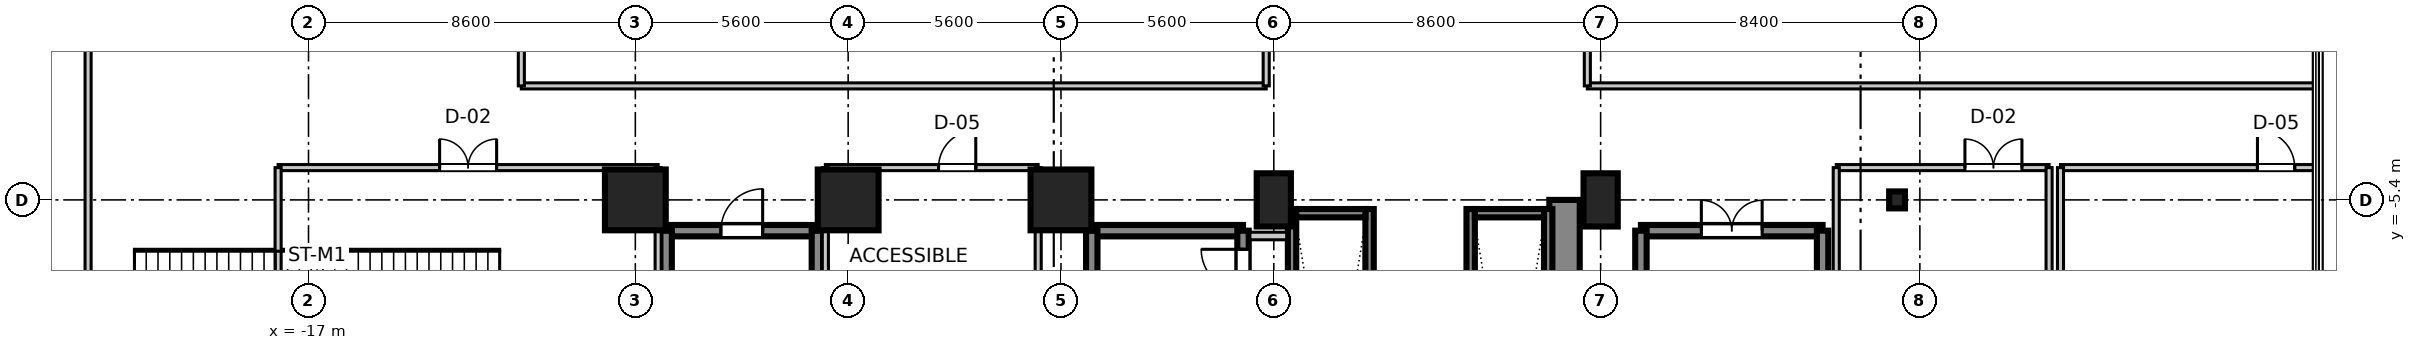
"""IFC4 building model, lengths in metres.
Left out: names, types, materials, properties, quantities, classifications, styles, units other than length and angle.
Written with IfcOpenShell. Run it as: python <this file> out.ifc"""

import sys

from ifc_helpers import new_model, si_unit, direction, frame, frame_2d, origin, origin_2d, place, context, subcontext, project, spatial, rectangle, i_section, extrude, source, transform, mapped, element, fill, save


model = new_model("IFC4")
c1 = context("Model", 3, precision=1e-05, world=origin(), true_north=direction((0.0, 1.0)))
c2 = subcontext(c1, "Body", "Model", "MODEL_VIEW")
j1 = project(units=[si_unit("LENGTHUNIT", "METRE"), si_unit("PLANEANGLEUNIT", "RADIAN")], contexts=[c1])
p1 = place(None, origin())
s1 = spatial("IfcSite", under=j1, at=p1, CompositionType="ELEMENT")
p2 = place(p1, origin())
s2 = spatial("IfcBuilding", under=s1, at=p2, CompositionType="ELEMENT")
p3 = place(p2, frame((0.0, 0.0, 16.2)))
s3 = spatial("IfcBuildingStorey", under=s2, at=p3, CompositionType="ELEMENT", Elevation=16.2)
m1 = source(origin(), c2, "Body", "SweptSolid", [
    extrude(rectangle(XDim=1.6, YDim=1.6, at=origin_2d()), origin(), (0.0, 0.0, 1.0), 5.355),
])
for number, where, z_axis, x_axis in (
    (1, (-8.4, -5.4, 0.0), (0.0, 0.0, 1.0), (1.0, 0.0, 0.0)),
    (2, (-2.8, -5.4, 0.0), (0.0, 0.0, 1.0), (1.0, 0.0, 0.0)),
    (3, (2.8, -5.4, 0.0), (0.0, 0.0, 1.0), (1.0, 0.0, 0.0)),
):
    element("IfcColumn", number, at=place(p3, frame(where, z_axis=z_axis, x_axis=x_axis)), inside=s3, PredefinedType="COLUMN", context=c2, shape_type="MappedRepresentation", body=[
        mapped(m1, transform((0.0, 0.0, 0.0), scale=1.0)),
    ])
m2 = source(origin(), c2, "Body", "SweptSolid", [
    extrude(rectangle(XDim=0.9, YDim=1.4, at=origin_2d()), origin(), (0.0, 0.0, 1.0), 5.355),
])
for number, where, z_axis, x_axis in (
    (4, (8.4, -5.4, 0.0), (0.0, 0.0, 1.0), (1.0, 0.0, 0.0)),
    (5, (17.0, -5.4, 0.0), (0.0, 0.0, 1.0), (1.0, 0.0, 0.0)),
):
    element("IfcColumn", number, at=place(p3, frame(where, z_axis=z_axis, x_axis=x_axis)), inside=s3, PredefinedType="PILASTER", context=c2, shape_type="MappedRepresentation", body=[
        mapped(m2, transform((0.0, 0.0, 0.0), scale=1.0)),
    ])
m3 = source(origin(), c2, "Body", "SweptSolid", [
    extrude(i_section(OverallWidth=0.416, OverallDepth=0.446, WebThickness=0.025, FlangeThickness=0.04, at=origin_2d()), origin(), (0.0, 0.0, 1.0), 5.355),
])
p4 = place(p3, frame((24.8, -5.4, 0.0), z_axis=(0.0, 0.0, 1.0), x_axis=(1.0, 0.0, 0.0)))
e6 = element("IfcColumn", 6, at=p4, inside=s3, PredefinedType="COLUMN", context=c2, shape_type="MappedRepresentation", body=[
    mapped(m3, transform((0.0, 0.0, 0.0), scale=1.0)),
])
m4 = source(origin(), c2, "Body", "SweptSolid", [
    extrude(rectangle(XDim=11.6, YDim=0.8, at=frame_2d((5.8, 0.0))), origin(), (0.0, 0.0, 1.0), 5.08),
])
p5 = place(p3, frame((16.05, -17.0, 0.0), z_axis=(0.0, 0.0, 1.0), x_axis=(0.0, 1.0, 0.0)))
e7 = element("IfcWall", 7, at=p5, inside=s3, PredefinedType="SHEAR", context=c2, shape_type="MappedRepresentation", body=[
    mapped(m4, transform((0.0, 0.0, 0.0), scale=1.0)),
])
m5 = source(origin(), c2, "Body", "SweptSolid", [
    extrude(rectangle(XDim=3.98, YDim=0.3, at=frame_2d((1.99, 0.0))), origin(), (0.0, 0.0, 1.0), 5.08),
])
p6 = place(p3, frame((3.61, -6.21, 0.0), z_axis=(0.0, 0.0, 1.0), x_axis=(1.0, 0.0, 0.0)))
e8 = element("IfcWall", 8, at=p6, inside=s3, PredefinedType="SHEAR", context=c2, shape_type="MappedRepresentation", body=[
    mapped(m5, transform((0.0, 0.0, 0.0), scale=1.0)),
])
m6 = source(origin(), c2, "Body", "SweptSolid", [
    extrude(rectangle(XDim=9.38, YDim=0.3, at=frame_2d((4.69, 0.0))), origin(), (0.0, 0.0, 1.0), 5.08),
])
p7 = place(p3, frame((3.61, -15.59, 0.0), z_axis=(0.0, 0.0, 1.0), x_axis=(0.0, 1.0, 0.0)))
e9 = element("IfcWall", 9, at=p7, inside=s3, PredefinedType="SHEAR", context=c2, shape_type="MappedRepresentation", body=[
    mapped(m6, transform((0.0, 0.0, 0.0), scale=1.0)),
])
p8 = place(p3, frame((7.59, -15.59, 0.0), z_axis=(0.0, 0.0, 1.0), x_axis=(0.0, 1.0, 0.0)))
e10 = element("IfcWall", 10, at=p8, inside=s3, PredefinedType="SHEAR", context=c2, shape_type="MappedRepresentation", body=[
    mapped(m6, transform((0.0, 0.0, 0.0), scale=1.0)),
])
p9 = place(p8, frame((7.79, 0.0, 0.0)))
e11 = element("IfcOpeningElement", 11, at=p9, cuts=e10, PredefinedType="OPENING", context=c2, shape_type="SweptSolid", body=[
    extrude(rectangle(XDim=1.1, YDim=2.15, at=frame_2d((0.55, 1.075))), frame((0.0, 0.16, 0.0), z_axis=(0.0, -1.0, 0.0), x_axis=(1.0, 0.0, 0.0)), (0.0, 0.0, 1.0), 0.32),
])
p10 = place(p3, frame((-7.59, -6.21, 0.0), z_axis=(0.0, 0.0, 1.0), x_axis=(1.0, 0.0, 0.0)))
e12 = element("IfcWall", 12, at=p10, inside=s3, PredefinedType="SHEAR", context=c2, shape_type="MappedRepresentation", body=[
    mapped(m5, transform((0.0, 0.0, 0.0), scale=1.0)),
])
p11 = place(p10, frame((1.44, 0.0, 0.0)))
e13 = element("IfcOpeningElement", 13, at=p11, cuts=e12, PredefinedType="OPENING", context=c2, shape_type="SweptSolid", body=[
    extrude(rectangle(XDim=1.1, YDim=2.15, at=frame_2d((0.55, 1.075))), frame((0.0, 0.16, 0.0), z_axis=(0.0, -1.0, 0.0), x_axis=(1.0, 0.0, 0.0)), (0.0, 0.0, 1.0), 0.32),
])
for number, where, z_axis, x_axis in (
    (14, (-7.59, -15.59, 0.0), (0.0, 0.0, 1.0), (0.0, 1.0, 0.0)),
    (15, (-3.61, -15.59, 0.0), (0.0, 0.0, 1.0), (0.0, 1.0, 0.0)),
):
    element("IfcWall", number, at=place(p3, frame(where, z_axis=z_axis, x_axis=x_axis)), inside=s3, PredefinedType="SHEAR", context=c2, shape_type="MappedRepresentation", body=[
        mapped(m6, transform((0.0, 0.0, 0.0), scale=1.0)),
    ])
m7 = source(origin(), c2, "Body", "SweptSolid", [
    extrude(rectangle(XDim=4.78, YDim=0.3, at=frame_2d((2.39, 0.0))), origin(), (0.0, 0.0, 1.0), 5.08),
])
p12 = place(p3, frame((18.06, -6.21, 0.0), z_axis=(0.0, 0.0, 1.0), x_axis=(1.0, 0.0, 0.0)))
e16 = element("IfcWall", 16, at=p12, inside=s3, PredefinedType="SHEAR", context=c2, shape_type="MappedRepresentation", body=[
    mapped(m7, transform((0.0, 0.0, 0.0), scale=1.0)),
])
p13 = place(p12, frame((1.59, 0.0, 0.0)))
e17 = element("IfcOpeningElement", 17, at=p13, cuts=e16, PredefinedType="OPENING", context=c2, shape_type="SweptSolid", body=[
    extrude(rectangle(XDim=1.6, YDim=2.2, at=frame_2d((0.8, 1.1))), frame((0.0, 0.16, 0.0), z_axis=(0.0, -1.0, 0.0), x_axis=(1.0, 0.0, 0.0)), (0.0, 0.0, 1.0), 0.32),
])
m8 = source(origin(), c2, "Body", "SweptSolid", [
    extrude(rectangle(XDim=9.63, YDim=0.3, at=frame_2d((4.815, 0.0))), origin(), (0.0, 0.0, 1.0), 5.08),
])
for number, where, z_axis, x_axis in (
    (18, (18.06, -15.84, 0.0), (0.0, 0.0, 1.0), (0.0, 1.0, 0.0)),
    (19, (22.84, -15.84, 0.0), (0.0, 0.0, 1.0), (0.0, 1.0, 0.0)),
):
    element("IfcWall", number, at=place(p3, frame(where, z_axis=z_axis, x_axis=x_axis)), inside=s3, PredefinedType="SHEAR", context=c2, shape_type="MappedRepresentation", body=[
        mapped(m8, transform((0.0, 0.0, 0.0), scale=1.0)),
    ])
m9 = source(origin(), c2, "Body", "SweptSolid", [
    extrude(rectangle(XDim=2.36, YDim=0.22, at=frame_2d((1.18, 0.0))), origin(), (0.0, 0.0, 1.0), 5.08),
])
for number, where, z_axis, x_axis in (
    (20, (13.58, -8.0, 0.0), (0.0, 0.0, 1.0), (0.0, 1.0, 0.0)),
    (21, (15.62, -8.0, 0.0), (0.0, 0.0, 1.0), (0.0, 1.0, 0.0)),
):
    element("IfcWall", number, at=place(p3, frame(where, z_axis=z_axis, x_axis=x_axis)), inside=s3, PredefinedType="SHEAR", context=c2, shape_type="MappedRepresentation", body=[
        mapped(m9, transform((0.0, 0.0, 0.0), scale=1.0)),
    ])
m10 = source(origin(), c2, "Body", "SweptSolid", [
    extrude(rectangle(XDim=1.82, YDim=0.22, at=frame_2d((0.91, 0.0))), origin(), (0.0, 0.0, 1.0), 5.08),
])
p14 = place(p3, frame((13.69, -5.75, 0.0), z_axis=(0.0, 0.0, 1.0), x_axis=(1.0, 0.0, 0.0)))
e22 = element("IfcWall", 22, at=p14, inside=s3, PredefinedType="SHEAR", context=c2, shape_type="MappedRepresentation", body=[
    mapped(m10, transform((0.0, 0.0, 0.0), scale=1.0)),
])
for number, where, z_axis, x_axis in (
    (23, (8.88, -8.0, 0.0), (0.0, 0.0, 1.0), (0.0, 1.0, 0.0)),
    (24, (10.92, -8.0, 0.0), (0.0, 0.0, 1.0), (0.0, 1.0, 0.0)),
):
    element("IfcWall", number, at=place(p3, frame(where, z_axis=z_axis, x_axis=x_axis)), inside=s3, PredefinedType="SHEAR", context=c2, shape_type="MappedRepresentation", body=[
        mapped(m9, transform((0.0, 0.0, 0.0), scale=1.0)),
    ])
p15 = place(p3, frame((8.99, -5.75, 0.0), z_axis=(0.0, 0.0, 1.0), x_axis=(1.0, 0.0, 0.0)))
e25 = element("IfcWall", 25, at=p15, inside=s3, PredefinedType="SHEAR", context=c2, shape_type="MappedRepresentation", body=[
    mapped(m10, transform((0.0, 0.0, 0.0), scale=1.0)),
])
m11 = source(origin(), c2, "Body", "SweptSolid", [
    extrude(rectangle(XDim=0.97, YDim=0.2, at=frame_2d((0.485, 0.0))), origin(), (0.0, 0.0, 1.0), 3.4),
])
p16 = place(p3, frame((7.77, -6.35, 0.0), z_axis=(0.0, 0.0, 1.0), x_axis=(1.0, 0.0, 0.0)))
e26 = element("IfcWall", 26, at=p16, inside=s3, PredefinedType="PARTITIONING", context=c2, shape_type="MappedRepresentation", body=[
    mapped(m11, transform((0.0, 0.0, 0.0), scale=1.0)),
])
m12 = source(origin(), c2, "Body", "SweptSolid", [
    extrude(rectangle(XDim=33.6, YDim=0.16, at=frame_2d((16.8, 0.0))), origin(), (0.0, 0.0, 1.0), 3.4),
])
p17 = place(p3, frame((-22.8, -16.8, 0.0), z_axis=(0.0, 0.0, 1.0), x_axis=(0.0, 1.0, 0.0)))
e27 = element("IfcWall", 27, at=p17, inside=s3, PredefinedType="PARTITIONING", context=c2, shape_type="MappedRepresentation", body=[
    mapped(m12, transform((0.0, 0.0, 0.0), scale=1.0)),
])
p18 = place(p17, frame((16.05, 0.0, 0.0)))
e28 = element("IfcOpeningElement", 28, at=p18, cuts=e27, PredefinedType="OPENING", context=c2, shape_type="SweptSolid", body=[
    extrude(rectangle(XDim=1.5, YDim=2.15, at=frame_2d((0.75, 1.075))), frame((0.0, 0.09, 0.0), z_axis=(0.0, -1.0, 0.0), x_axis=(1.0, 0.0, 0.0)), (0.0, 0.0, 1.0), 0.18),
])
m13 = source(origin(), c2, "Body", "SweptSolid", [
    extrude(rectangle(XDim=19.6, YDim=0.16, at=frame_2d((9.8, 0.0))), origin(), (0.0, 0.0, 1.0), 3.4),
])
p19 = place(p3, frame((-11.4, -2.4, 0.0), z_axis=(0.0, 0.0, 1.0), x_axis=(1.0, 0.0, 0.0)))
e29 = element("IfcWall", 29, at=p19, inside=s3, PredefinedType="PARTITIONING", context=c2, shape_type="MappedRepresentation", body=[
    mapped(m13, transform((0.0, 0.0, 0.0), scale=1.0)),
])
m14 = source(origin(), c2, "Body", "SweptSolid", [
    extrude(rectangle(XDim=4.8, YDim=0.16, at=frame_2d((2.4, 0.0))), origin(), (0.0, 0.0, 1.0), 3.4),
])
for number, where, z_axis, x_axis in (
    (30, (-11.4, -2.4, 0.0), (0.0, 0.0, 1.0), (0.0, 1.0, 0.0)),
    (31, (8.2, -2.4, 0.0), (0.0, 0.0, 1.0), (0.0, 1.0, 0.0)),
):
    element("IfcWall", number, at=place(p3, frame(where, z_axis=z_axis, x_axis=x_axis)), inside=s3, PredefinedType="PARTITIONING", context=c2, shape_type="MappedRepresentation", body=[
        mapped(m14, transform((0.0, 0.0, 0.0), scale=1.0)),
    ])
m15 = source(origin(), c2, "Body", "SweptSolid", [
    extrude(rectangle(XDim=19.11, YDim=0.16, at=frame_2d((9.555, 0.0))), origin(), (0.0, 0.0, 1.0), 3.4),
])
p20 = place(p3, frame((16.65, -2.4, 0.0), z_axis=(0.0, 0.0, 1.0), x_axis=(1.0, 0.0, 0.0)))
e32 = element("IfcWall", 32, at=p20, inside=s3, PredefinedType="PARTITIONING", context=c2, shape_type="MappedRepresentation", body=[
    mapped(m15, transform((0.0, 0.0, 0.0), scale=1.0)),
])
p21 = place(p3, frame((16.65, -2.4, 0.0), z_axis=(0.0, 0.0, 1.0), x_axis=(0.0, 1.0, 0.0)))
e33 = element("IfcWall", 33, at=p21, inside=s3, PredefinedType="PARTITIONING", context=c2, shape_type="MappedRepresentation", body=[
    mapped(m14, transform((0.0, 0.0, 0.0), scale=1.0)),
])
m16 = source(origin(), c2, "Body", "SweptSolid", [
    extrude(rectangle(XDim=10.0, YDim=0.16, at=frame_2d((5.0, 0.0))), origin(), (0.0, 0.0, 1.0), 3.4),
])
p22 = place(p3, frame((-17.8, -4.55, 0.0), z_axis=(0.0, 0.0, 1.0), x_axis=(1.0, 0.0, 0.0)))
e34 = element("IfcWall", 34, at=p22, inside=s3, PredefinedType="PARTITIONING", context=c2, shape_type="MappedRepresentation", body=[
    mapped(m16, transform((0.0, 0.0, 0.0), scale=1.0)),
])
p23 = place(p22, frame((4.25, 0.0, 0.0)))
e35 = element("IfcOpeningElement", 35, at=p23, cuts=e34, PredefinedType="OPENING", context=c2, shape_type="SweptSolid", body=[
    extrude(rectangle(XDim=1.5, YDim=2.15, at=frame_2d((0.75, 1.075))), frame((0.0, 0.09, 0.0), z_axis=(0.0, -1.0, 0.0), x_axis=(1.0, 0.0, 0.0)), (0.0, 0.0, 1.0), 0.18),
])
m17 = source(origin(), c2, "Body", "SweptSolid", [
    extrude(rectangle(XDim=19.21, YDim=0.16, at=frame_2d((9.605, 0.0))), origin(), (0.0, 0.0, 1.0), 3.4),
])
for number, where, z_axis, x_axis in (
    (36, (-17.8, -23.76, 0.0), (0.0, 0.0, 1.0), (0.0, 1.0, 0.0)),
    (37, (-7.8, -23.76, 0.0), (0.0, 0.0, 1.0), (0.0, 1.0, 0.0)),
):
    element("IfcWall", number, at=place(p3, frame(where, z_axis=z_axis, x_axis=x_axis)), inside=s3, PredefinedType="PARTITIONING", context=c2, shape_type="MappedRepresentation", body=[
        mapped(m17, transform((0.0, 0.0, 0.0), scale=1.0)),
    ])
m18 = source(origin(), c2, "Body", "SweptSolid", [
    extrude(rectangle(XDim=5.6, YDim=0.16, at=frame_2d((2.8, 0.0))), origin(), (0.0, 0.0, 1.0), 3.4),
])
p24 = place(p3, frame((23.2, -4.55, 0.0), z_axis=(0.0, 0.0, 1.0), x_axis=(1.0, 0.0, 0.0)))
e38 = element("IfcWall", 38, at=p24, inside=s3, PredefinedType="PARTITIONING", context=c2, shape_type="MappedRepresentation", body=[
    mapped(m18, transform((0.0, 0.0, 0.0), scale=1.0)),
])
p25 = place(p24, frame((3.386, 0.0, 0.0)))
e39 = element("IfcOpeningElement", 39, at=p25, cuts=e38, PredefinedType="OPENING", context=c2, shape_type="SweptSolid", body=[
    extrude(rectangle(XDim=1.5, YDim=2.15, at=frame_2d((0.75, 1.075))), frame((0.0, 0.09, 0.0), z_axis=(0.0, -1.0, 0.0), x_axis=(1.0, 0.0, 0.0)), (0.0, 0.0, 1.0), 0.18),
])
for number, where, z_axis, x_axis in (
    (40, (23.2, -23.76, 0.0), (0.0, 0.0, 1.0), (0.0, 1.0, 0.0)),
    (41, (28.8, -23.76, 0.0), (0.0, 0.0, 1.0), (0.0, 1.0, 0.0)),
):
    element("IfcWall", number, at=place(p3, frame(where, z_axis=z_axis, x_axis=x_axis)), inside=s3, PredefinedType="PARTITIONING", context=c2, shape_type="MappedRepresentation", body=[
        mapped(m17, transform((0.0, 0.0, 0.0), scale=1.0)),
    ])
m19 = source(origin(), c2, "Body", "SweptSolid", [
    extrude(rectangle(XDim=6.66, YDim=0.16, at=frame_2d((3.33, 0.0))), origin(), (0.0, 0.0, 1.0), 3.4),
])
p26 = place(p3, frame((29.1, -4.55, 0.0), z_axis=(0.0, 0.0, 1.0), x_axis=(1.0, 0.0, 0.0)))
e42 = element("IfcWall", 42, at=p26, inside=s3, PredefinedType="PARTITIONING", context=c2, shape_type="MappedRepresentation", body=[
    mapped(m19, transform((0.0, 0.0, 0.0), scale=1.0)),
])
p27 = place(p26, frame((5.183, 0.0, 0.0)))
e43 = element("IfcOpeningElement", 43, at=p27, cuts=e42, PredefinedType="OPENING", context=c2, shape_type="SweptSolid", body=[
    extrude(rectangle(XDim=0.98, YDim=2.1, at=frame_2d((0.49, 1.05))), frame((0.0, 0.09, 0.0), z_axis=(0.0, -1.0, 0.0), x_axis=(1.0, 0.0, 0.0)), (0.0, 0.0, 1.0), 0.18),
])
m20 = source(origin(), c2, "Body", "SweptSolid", [
    extrude(rectangle(XDim=7.45, YDim=0.16, at=frame_2d((3.725, 0.0))), origin(), (0.0, 0.0, 1.0), 3.4),
])
p28 = place(p3, frame((29.1, -12.0, 0.0), z_axis=(0.0, 0.0, 1.0), x_axis=(0.0, 1.0, 0.0)))
e44 = element("IfcWall", 44, at=p28, inside=s3, PredefinedType="PARTITIONING", context=c2, shape_type="MappedRepresentation", body=[
    mapped(m20, transform((0.0, 0.0, 0.0), scale=1.0)),
])
m21 = source(origin(), c2, "Body", "SweptSolid", [
    extrude(rectangle(XDim=5.6, YDim=0.16, at=frame_2d((2.8, 0.0))), origin(), (0.0, 0.0, 1.0), 3.4),
])
p29 = place(p3, frame((-3.4, -4.55, 0.0), z_axis=(0.0, 0.0, 1.0), x_axis=(1.0, 0.0, 0.0)))
e45 = element("IfcWall", 45, at=p29, inside=s3, PredefinedType="PARTITIONING", context=c2, shape_type="MappedRepresentation", body=[
    mapped(m21, transform((0.0, 0.0, 0.0), scale=1.0)),
])
p30 = place(p29, frame((2.978, 0.0, 0.0)))
e46 = element("IfcOpeningElement", 46, at=p30, cuts=e45, PredefinedType="OPENING", context=c2, shape_type="SweptSolid", body=[
    extrude(rectangle(XDim=0.98, YDim=2.1, at=frame_2d((0.49, 1.05))), frame((0.0, 0.09, 0.0), z_axis=(0.0, -1.0, 0.0), x_axis=(1.0, 0.0, 0.0)), (0.0, 0.0, 1.0), 0.18),
])
m22 = source(origin(), c2, "Body", "SweptSolid", [
    extrude(rectangle(XDim=5.25, YDim=0.16, at=frame_2d((2.625, 0.0))), origin(), (0.0, 0.0, 1.0), 3.4),
])
for number, where, z_axis, x_axis in (
    (47, (-3.4, -9.8, 0.0), (0.0, 0.0, 1.0), (0.0, 1.0, 0.0)),
    (48, (2.2, -9.8, 0.0), (0.0, 0.0, 1.0), (0.0, 1.0, 0.0)),
):
    element("IfcWall", number, at=place(p3, frame(where, z_axis=z_axis, x_axis=x_axis)), inside=s3, PredefinedType="PARTITIONING", context=c2, shape_type="MappedRepresentation", body=[
        mapped(m22, transform((0.0, 0.0, 0.0), scale=1.0)),
    ])
m23 = source(origin(), c2, "Body", "SweptSolid", [
    extrude(rectangle(XDim=1.1, YDim=2.15, at=frame_2d((0.55, 1.075))), frame((0.0, 0.025, 0.0), z_axis=(0.0, -1.0, 0.0), x_axis=(1.0, 0.0, 0.0)), (0.0, 0.0, 1.0), 0.05),
])
p31 = place(p9, origin())
e49 = element("IfcDoor", 49, at=p31, inside=s3, OperationType="SINGLE_SWING_RIGHT", PredefinedType="DOOR", context=c2, shape_type="MappedRepresentation", body=[
    mapped(m23, transform((0.0, 0.0, 0.0), scale=1.0)),
])
fill(e11, e49)
p32 = place(p11, frame((1.1, 0.0, 0.0), z_axis=(0.0, 0.0, 1.0), x_axis=(-1.0, 0.0, 0.0)))
e50 = element("IfcDoor", 50, at=p32, inside=s3, OperationType="SINGLE_SWING_RIGHT", PredefinedType="DOOR", context=c2, shape_type="MappedRepresentation", body=[
    mapped(m23, transform((0.0, 0.0, 0.0), scale=1.0)),
])
fill(e13, e50)
m24 = source(origin(), c2, "Body", "SweptSolid", [
    extrude(rectangle(XDim=1.6, YDim=2.2, at=frame_2d((0.8, 1.1))), frame((0.0, 0.025, 0.0), z_axis=(0.0, -1.0, 0.0), x_axis=(1.0, 0.0, 0.0)), (0.0, 0.0, 1.0), 0.05),
])
p33 = place(p13, frame((1.6, 0.0, 0.0), z_axis=(0.0, 0.0, 1.0), x_axis=(-1.0, 0.0, 0.0)))
e51 = element("IfcDoor", 51, at=p33, inside=s3, OperationType="DOUBLE_DOOR_SINGLE_SWING", PredefinedType="DOOR", context=c2, shape_type="MappedRepresentation", body=[
    mapped(m24, transform((0.0, 0.0, 0.0), scale=1.0)),
])
fill(e17, e51)
m25 = source(origin(), c2, "Body", "SweptSolid", [
    extrude(rectangle(XDim=1.5, YDim=2.15, at=frame_2d((0.75, 1.075))), frame((0.0, 0.025, 0.0), z_axis=(0.0, -1.0, 0.0), x_axis=(1.0, 0.0, 0.0)), (0.0, 0.0, 1.0), 0.05),
])
p34 = place(p23, frame((1.5, 0.0, 0.0), z_axis=(0.0, 0.0, 1.0), x_axis=(-1.0, 0.0, 0.0)))
e52 = element("IfcDoor", 52, at=p34, inside=s3, OperationType="DOUBLE_DOOR_SINGLE_SWING", PredefinedType="DOOR", context=c2, shape_type="MappedRepresentation", body=[
    mapped(m25, transform((0.0, 0.0, 0.0), scale=1.0)),
])
fill(e35, e52)
p35 = place(p25, frame((1.5, 0.0, 0.0), z_axis=(0.0, 0.0, 1.0), x_axis=(-1.0, 0.0, 0.0)))
e53 = element("IfcDoor", 53, at=p35, inside=s3, OperationType="DOUBLE_DOOR_SINGLE_SWING", PredefinedType="DOOR", context=c2, shape_type="MappedRepresentation", body=[
    mapped(m25, transform((0.0, 0.0, 0.0), scale=1.0)),
])
fill(e39, e53)
m26 = source(origin(), c2, "Body", "SweptSolid", [
    extrude(rectangle(XDim=0.98, YDim=2.1, at=frame_2d((0.49, 1.05))), frame((0.0, 0.025, 0.0), z_axis=(0.0, -1.0, 0.0), x_axis=(1.0, 0.0, 0.0)), (0.0, 0.0, 1.0), 0.05),
])
p36 = place(p27, frame((0.98, 0.0, 0.0), z_axis=(0.0, 0.0, 1.0), x_axis=(-1.0, 0.0, 0.0)))
e54 = element("IfcDoor", 54, at=p36, inside=s3, OperationType="SINGLE_SWING_LEFT", PredefinedType="DOOR", context=c2, shape_type="MappedRepresentation", body=[
    mapped(m26, transform((0.0, 0.0, 0.0), scale=1.0)),
])
fill(e43, e54)
p37 = place(p30, frame((0.98, 0.0, 0.0), z_axis=(0.0, 0.0, 1.0), x_axis=(-1.0, 0.0, 0.0)))
e55 = element("IfcDoor", 55, at=p37, inside=s3, OperationType="SINGLE_SWING_RIGHT", PredefinedType="DOOR", context=c2, shape_type="MappedRepresentation", body=[
    mapped(m26, transform((0.0, 0.0, 0.0), scale=1.0)),
])
fill(e46, e55)
save(model, sys.argv[1])
